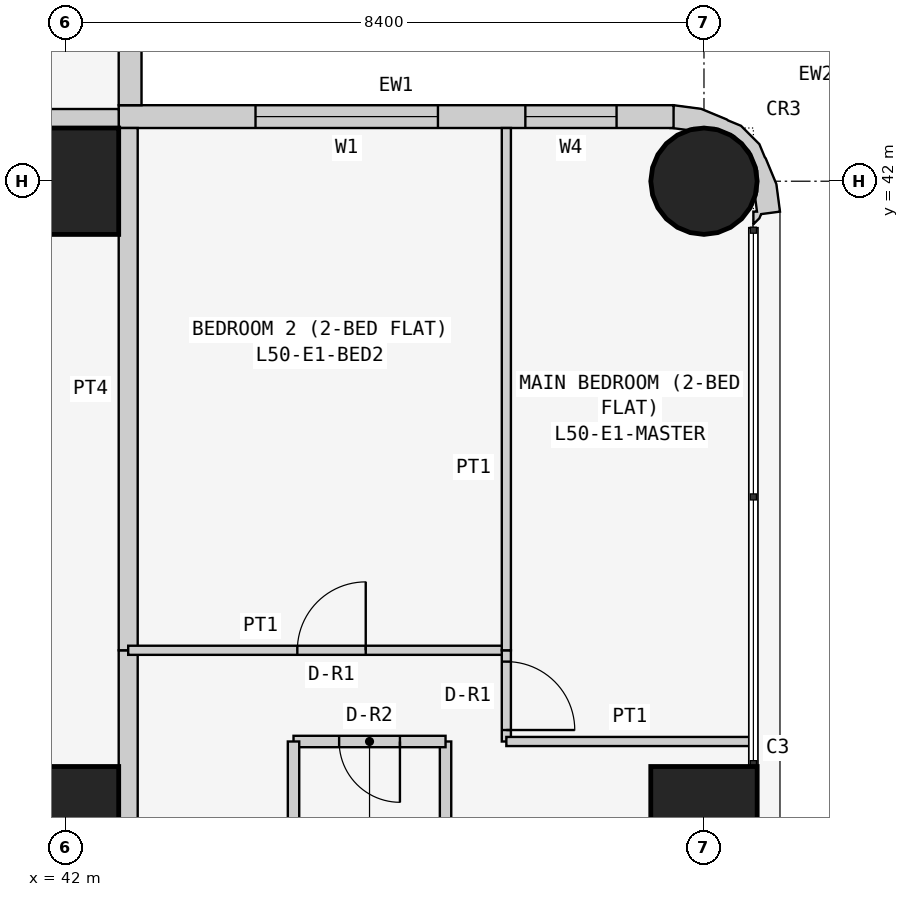
"""IFC4 building model, lengths in metres.
Left out: names, types, materials, properties, quantities, classifications, styles, units other than length and angle.
Written with IfcOpenShell. Run it as: python <this file> out.ifc"""

import sys

from ifc_helpers import new_model, si_unit, direction, frame, frame_2d, origin, origin_2d, place, context, subcontext, project, spatial, polyline, rectangle, circle, outline, extrude, element, fill, save


model = new_model("IFC4")
c1 = context("Model", 3, precision=1e-05, world=origin(), true_north=direction((0.0, 1.0)))
c2 = subcontext(c1, "Body", "Model", "MODEL_VIEW")
j1 = project(units=[si_unit("LENGTHUNIT", "METRE"), si_unit("PLANEANGLEUNIT", "RADIAN")], contexts=[c1])
p1 = place(None, origin())
s1 = spatial("IfcSite", under=j1, at=p1, CompositionType="ELEMENT")
p2 = place(p1, origin())
s2 = spatial("IfcBuilding", under=s1, at=p2, CompositionType="ELEMENT")
p3 = place(p2, frame((0.0, 0.0, 194.1)))
s3 = spatial("IfcBuildingStorey", under=s2, at=p3, CompositionType="ELEMENT", Elevation=194.1)
for number, where, z_axis, x_axis in (
    (1, (42.0, 33.6, 0.0), (0.0, 0.0, 1.0), (1.0, 0.0, 0.0)),
    (2, (42.0, 42.0, 0.0), (0.0, 0.0, 1.0), (1.0, 0.0, 0.0)),
    (3, (50.4, 33.6, 0.0), (0.0, 0.0, 1.0), (1.0, 0.0, 0.0)),
):
    element("IfcColumn", number, at=place(p3, frame(where, z_axis=z_axis, x_axis=x_axis)), inside=s3, PredefinedType="COLUMN", context=c2, shape_type="SweptSolid", body=[
        extrude(rectangle(XDim=1.4, YDim=1.4, at=origin_2d()), origin(), (0.0, 0.0, 1.0), 3.6),
    ])
p4 = place(p3, frame((50.4, 42.0, 0.0), z_axis=(0.0, 0.0, 1.0), x_axis=(1.0, 0.0, 0.0)))
e4 = element("IfcColumn", 4, at=p4, inside=s3, PredefinedType="COLUMN", context=c2, shape_type="SweptSolid", body=[
    extrude(circle(Radius=0.7, at=origin_2d()), origin(), (0.0, 0.0, 1.0), 3.6),
])
p5 = place(p3, frame((50.0, 42.85, 0.0), z_axis=(0.0, 0.0, 1.0), x_axis=(-1.0, 0.0, 0.0)))
e5 = element("IfcWall", 5, at=p5, inside=s3, PredefinedType="SOLIDWALL", context=c2, shape_type="SweptSolid", body=[
    extrude(rectangle(XDim=7.3, YDim=0.3, at=frame_2d((3.65, 0.0))), origin(), (0.0, 0.0, 1.0), 3.45),
])
p6 = place(p5, frame((3.1, 0.0, 0.9)))
e6 = element("IfcOpeningElement", 6, at=p6, cuts=e5, PredefinedType="OPENING", context=c2, shape_type="SweptSolid", body=[
    extrude(rectangle(XDim=2.4, YDim=1.5, at=frame_2d((1.2, 0.75))), frame((0.0, 0.16, 0.0), z_axis=(0.0, -1.0, 0.0), x_axis=(1.0, 0.0, 0.0)), (0.0, 0.0, 1.0), 0.32),
])
p7 = place(p5, frame((0.75, 0.0, 0.9)))
e7 = element("IfcOpeningElement", 7, at=p7, cuts=e5, PredefinedType="OPENING", context=c2, shape_type="SweptSolid", body=[
    extrude(rectangle(XDim=1.2, YDim=1.5, at=frame_2d((0.6, 0.75))), frame((0.0, 0.16, 0.0), z_axis=(0.0, -1.0, 0.0), x_axis=(1.0, 0.0, 0.0)), (0.0, 0.0, 1.0), 0.32),
])
p8 = place(p3, frame((42.85, 43.0, 0.0), z_axis=(0.0, 0.0, 1.0), x_axis=(0.0, 1.0, 0.0)))
e8 = element("IfcWall", 8, at=p8, inside=s3, PredefinedType="SOLIDWALL", context=c2, shape_type="SweptSolid", body=[
    extrude(rectangle(XDim=7.0, YDim=0.3, at=frame_2d((3.5, 0.0))), origin(), (0.0, 0.0, 1.0), 3.45),
])
p9 = place(p8, frame((1.5, 0.0, 0.9)))
e9 = element("IfcOpeningElement", 9, at=p9, cuts=e8, PredefinedType="OPENING", context=c2, shape_type="SweptSolid", body=[
    extrude(rectangle(XDim=2.4, YDim=1.5, at=frame_2d((1.2, 0.75))), frame((0.0, 0.16, 0.0), z_axis=(0.0, -1.0, 0.0), x_axis=(1.0, 0.0, 0.0)), (0.0, 0.0, 1.0), 0.32),
])
p10 = place(p8, frame((5.05, 0.0, 0.9)))
e10 = element("IfcOpeningElement", 10, at=p10, cuts=e8, PredefinedType="OPENING", context=c2, shape_type="SweptSolid", body=[
    extrude(rectangle(XDim=1.2, YDim=1.5, at=frame_2d((0.6, 0.75))), frame((0.0, 0.16, 0.0), z_axis=(0.0, -1.0, 0.0), x_axis=(1.0, 0.0, 0.0)), (0.0, 0.0, 1.0), 0.32),
])
p11 = place(p3, frame((50.988, 41.488, 0.0), z_axis=(0.0, 0.0, 1.0), x_axis=(0.898030234854, 0.439933741929, 0.0)))
e11 = element("IfcWall", 11, at=p11, inside=s3, PredefinedType="SOLIDWALL", context=c2, shape_type="SweptSolid", body=[
    extrude(outline(polyline([(0.138, -0.04), (0.182, -0.0), (0.419, -0.08), (0.536, 0.266), (0.559, 0.631), (0.555, 0.651), (0.566, 0.836), (0.455, 1.159), (0.333, 1.298), (0.324, 1.317), (0.082, 1.591), (-0.222, 1.793), (-0.39, 1.541), (-0.372, 1.532), (-0.195, 1.414), (-0.12, 1.41), (0.131, 1.287), (0.315, 1.078), (0.406, 0.814), (0.388, 0.536), (0.265, 0.285), (0.209, 0.235), (0.148, 0.053), (0.105, 0.074), (0.032, -0.076), (0.138, -0.04)])), origin(), (0.0, 0.0, 1.0), 3.45),
])
p12 = place(p3, frame((35.829, 42.825, 0.0), z_axis=(0.0, 0.0, 1.0), x_axis=(1.0, 0.0, 0.0)))
e12 = element("IfcWall", 12, at=p12, inside=s3, PredefinedType="PARTITIONING", context=c2, shape_type="SweptSolid", body=[
    extrude(rectangle(XDim=6.871, YDim=0.25, at=frame_2d((3.436, 0.0))), origin(), (0.0, 0.0, 1.0), 3.45),
])
p13 = place(p3, frame((42.825, 35.829, 0.0), z_axis=(0.0, 0.0, 1.0), x_axis=(0.0, -1.0, 0.0)))
e13 = element("IfcWall", 13, at=p13, inside=s3, PredefinedType="PARTITIONING", context=c2, shape_type="SweptSolid", body=[
    extrude(rectangle(XDim=6.429, YDim=0.25, at=frame_2d((3.215, 0.0))), origin(), (0.0, 0.0, 1.0), 3.45),
])
p14 = place(p13, frame((4.929, 0.0, 0.0)))
e14 = element("IfcOpeningElement", 14, at=p14, cuts=e13, PredefinedType="OPENING", context=c2, shape_type="SweptSolid", body=[
    extrude(rectangle(XDim=1.0, YDim=2.1, at=frame_2d((0.5, 1.05))), frame((0.0, 0.135, 0.0), z_axis=(0.0, -1.0, 0.0), x_axis=(1.0, 0.0, 0.0)), (0.0, 0.0, 1.0), 0.27),
])
p15 = place(p3, frame((42.825, 42.7, 0.0), z_axis=(0.0, 0.0, 1.0), x_axis=(0.0, -1.0, 0.0)))
e15 = element("IfcWall", 15, at=p15, inside=s3, PredefinedType="PARTITIONING", context=c2, shape_type="SweptSolid", body=[
    extrude(rectangle(XDim=6.871, YDim=0.25, at=frame_2d((3.436, 0.0))), origin(), (0.0, 0.0, 1.0), 3.45),
])
p16 = place(p3, frame((47.0, 29.4, 0.0), z_axis=(0.0, 0.0, 1.0), x_axis=(0.0, 1.0, 0.0)))
e16 = element("IfcWall", 16, at=p16, inside=s3, PredefinedType="PARTITIONING", context=c2, shape_type="SweptSolid", body=[
    extrude(rectangle(XDim=5.229, YDim=0.15, at=frame_2d((2.615, 0.0))), origin(), (0.0, 0.0, 1.0), 3.45),
])
p17 = place(p3, frame((47.0, 34.629, 0.0), z_axis=(0.0, 0.0, 1.0), x_axis=(-1.0, 0.0, 0.0)))
e17 = element("IfcWall", 17, at=p17, inside=s3, PredefinedType="PARTITIONING", context=c2, shape_type="SweptSolid", body=[
    extrude(rectangle(XDim=2.0, YDim=0.15, at=frame_2d((1.0, 0.0))), origin(), (0.0, 0.0, 1.0), 3.45),
])
p18 = place(p17, frame((0.6, 0.0, 0.0)))
e18 = element("IfcOpeningElement", 18, at=p18, cuts=e17, PredefinedType="OPENING", context=c2, shape_type="SweptSolid", body=[
    extrude(rectangle(XDim=0.8, YDim=2.1, at=frame_2d((0.4, 1.05))), frame((0.0, 0.085, 0.0), z_axis=(0.0, -1.0, 0.0), x_axis=(1.0, 0.0, 0.0)), (0.0, 0.0, 1.0), 0.17),
])
p19 = place(p3, frame((45.0, 34.629, 0.0), z_axis=(0.0, 0.0, 1.0), x_axis=(0.0, -1.0, 0.0)))
e19 = element("IfcWall", 19, at=p19, inside=s3, PredefinedType="PARTITIONING", context=c2, shape_type="SweptSolid", body=[
    extrude(rectangle(XDim=5.229, YDim=0.15, at=frame_2d((2.615, 0.0))), origin(), (0.0, 0.0, 1.0), 3.45),
])
p20 = place(p3, frame((42.825, 35.829, 0.0), z_axis=(0.0, 0.0, 1.0), x_axis=(1.0, 0.0, 0.0)))
e20 = element("IfcWall", 20, at=p20, inside=s3, PredefinedType="PARTITIONING", context=c2, shape_type="SweptSolid", body=[
    extrude(rectangle(XDim=4.975, YDim=0.12, at=frame_2d((2.488, 0.0))), origin(), (0.0, 0.0, 1.0), 3.45),
])
p21 = place(p20, frame((2.225, 0.0, 0.0)))
e21 = element("IfcOpeningElement", 21, at=p21, cuts=e20, PredefinedType="OPENING", context=c2, shape_type="SweptSolid", body=[
    extrude(rectangle(XDim=0.9, YDim=2.1, at=frame_2d((0.45, 1.05))), frame((0.0, 0.07, 0.0), z_axis=(0.0, -1.0, 0.0), x_axis=(1.0, 0.0, 0.0)), (0.0, 0.0, 1.0), 0.14),
])
p22 = place(p3, frame((47.8, 35.829, 0.0), z_axis=(0.0, 0.0, 1.0), x_axis=(0.0, -1.0, 0.0)))
e22 = element("IfcWall", 22, at=p22, inside=s3, PredefinedType="PARTITIONING", context=c2, shape_type="SweptSolid", body=[
    extrude(rectangle(XDim=1.2, YDim=0.12, at=frame_2d((0.6, 0.0))), origin(), (0.0, 0.0, 1.0), 3.45),
])
p23 = place(p22, frame((0.149, 0.0, 0.0)))
e23 = element("IfcOpeningElement", 23, at=p23, cuts=e22, PredefinedType="OPENING", context=c2, shape_type="SweptSolid", body=[
    extrude(rectangle(XDim=0.9, YDim=2.1, at=frame_2d((0.45, 1.05))), frame((0.0, 0.07, 0.0), z_axis=(0.0, -1.0, 0.0), x_axis=(1.0, 0.0, 0.0)), (0.0, 0.0, 1.0), 0.14),
])
p24 = place(p3, frame((47.8, 34.629, 0.0), z_axis=(0.0, 0.0, 1.0), x_axis=(1.0, 0.0, 0.0)))
e24 = element("IfcWall", 24, at=p24, inside=s3, PredefinedType="PARTITIONING", context=c2, shape_type="SweptSolid", body=[
    extrude(rectangle(XDim=3.25, YDim=0.12, at=frame_2d((1.625, 0.0))), origin(), (0.0, 0.0, 1.0), 3.45),
])
p25 = place(p3, frame((47.8, 35.829, 0.0), z_axis=(0.0, 0.0, 1.0), x_axis=(0.0, 1.0, 0.0)))
e25 = element("IfcWall", 25, at=p25, inside=s3, PredefinedType="PARTITIONING", context=c2, shape_type="SweptSolid", body=[
    extrude(rectangle(XDim=6.871, YDim=0.12, at=frame_2d((3.436, 0.0))), origin(), (0.0, 0.0, 1.0), 3.45),
])
p26 = place(p6, origin())
e26 = element("IfcWindow", 26, at=p26, inside=s3, PartitioningType="SINGLE_PANEL", PredefinedType="WINDOW", context=c2, shape_type="SweptSolid", body=[
    extrude(rectangle(XDim=2.4, YDim=1.5, at=frame_2d((1.2, 0.75))), frame((0.0, 0.03, 0.0), z_axis=(0.0, -1.0, 0.0), x_axis=(1.0, 0.0, 0.0)), (0.0, 0.0, 1.0), 0.06),
])
fill(e6, e26)
p27 = place(p7, origin())
e27 = element("IfcWindow", 27, at=p27, inside=s3, PartitioningType="SINGLE_PANEL", PredefinedType="WINDOW", context=c2, shape_type="SweptSolid", body=[
    extrude(rectangle(XDim=1.2, YDim=1.5, at=frame_2d((0.6, 0.75))), frame((0.0, 0.03, 0.0), z_axis=(0.0, -1.0, 0.0), x_axis=(1.0, 0.0, 0.0)), (0.0, 0.0, 1.0), 0.06),
])
fill(e7, e27)
p28 = place(p18, origin())
e28 = element("IfcDoor", 28, at=p28, inside=s3, OperationType="SINGLE_SWING_LEFT", PredefinedType="DOOR", context=c2, shape_type="SweptSolid", body=[
    extrude(rectangle(XDim=0.8, YDim=2.1, at=frame_2d((0.4, 1.05))), frame((0.0, 0.025, 0.0), z_axis=(0.0, -1.0, 0.0), x_axis=(1.0, 0.0, 0.0)), (0.0, 0.0, 1.0), 0.05),
])
fill(e18, e28)
p29 = place(p21, origin())
e29 = element("IfcDoor", 29, at=p29, inside=s3, OperationType="SINGLE_SWING_RIGHT", PredefinedType="DOOR", context=c2, shape_type="SweptSolid", body=[
    extrude(rectangle(XDim=0.9, YDim=2.1, at=frame_2d((0.45, 1.05))), frame((0.0, 0.025, 0.0), z_axis=(0.0, -1.0, 0.0), x_axis=(1.0, 0.0, 0.0)), (0.0, 0.0, 1.0), 0.05),
])
fill(e21, e29)
p30 = place(p23, origin())
e30 = element("IfcDoor", 30, at=p30, inside=s3, OperationType="SINGLE_SWING_RIGHT", PredefinedType="DOOR", context=c2, shape_type="SweptSolid", body=[
    extrude(rectangle(XDim=0.9, YDim=2.1, at=frame_2d((0.45, 1.05))), frame((0.0, 0.025, 0.0), z_axis=(0.0, -1.0, 0.0), x_axis=(1.0, 0.0, 0.0)), (0.0, 0.0, 1.0), 0.05),
])
fill(e23, e30)
save(model, sys.argv[1])
